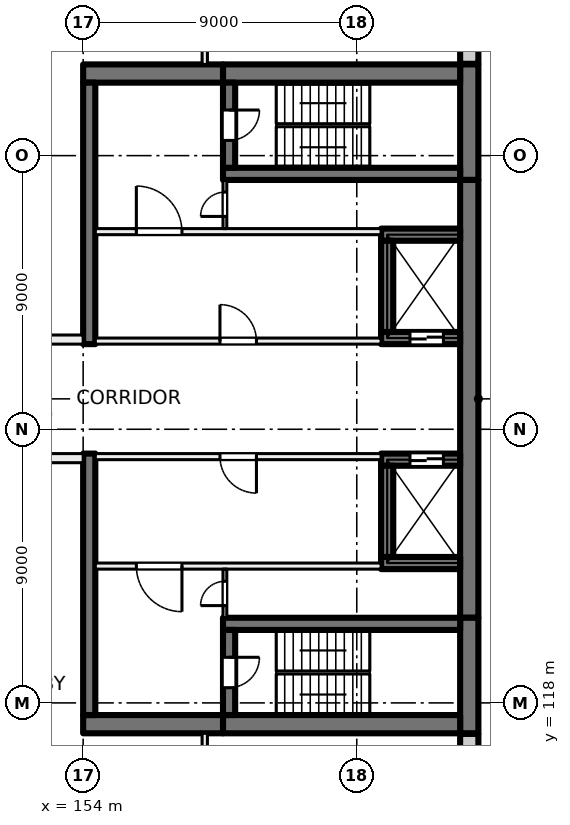
"""IFC4 building model, lengths in metres.
Left out: names, types, materials, properties, quantities, classifications, styles, units other than length and angle.
Written with IfcOpenShell. Run it as: python <this file> out.ifc"""

import sys

from ifc_helpers import new_model, si_unit, direction, frame, frame_2d, origin, place, context, subcontext, project, spatial, rectangle, extrude, element, fill, save


model = new_model("IFC4")
c1 = context("Model", 3, precision=1e-05, world=origin(), true_north=direction((0.0, 1.0)))
c2 = subcontext(c1, "Body", "Model", "MODEL_VIEW")
j1 = project(units=[si_unit("LENGTHUNIT", "METRE"), si_unit("PLANEANGLEUNIT", "RADIAN")], contexts=[c1])
p1 = place(None, origin())
s1 = spatial("IfcSite", under=j1, at=p1, CompositionType="ELEMENT")
p2 = place(p1, origin())
s2 = spatial("IfcBuilding", under=s1, at=p2, CompositionType="ELEMENT")
p3 = place(p2, frame((0.0, 0.0, 51.5)))
s3 = spatial("IfcBuildingStorey", under=s2, at=p3, CompositionType="ELEMENT", Elevation=51.5)
p4 = place(p3, frame((166.7, 139.0, 0.0), z_axis=(0.0, 0.0, 1.0), x_axis=(0.0, -1.0, 0.0)))
e1 = element("IfcWall", 1, at=p4, inside=s3, PredefinedType="SHEAR", context=c2, shape_type="SweptSolid", body=[
    extrude(rectangle(XDim=3.8, YDim=0.6, at=frame_2d((1.9, 0.0))), origin(), (0.0, 0.0, 1.0), 4.0),
])
p5 = place(p3, frame((166.7, 135.2, 0.0), z_axis=(0.0, 0.0, 1.0), x_axis=(0.0, -1.0, 0.0)))
e2 = element("IfcWall", 2, at=p5, inside=s3, PredefinedType="SHEAR", context=c2, shape_type="SweptSolid", body=[
    extrude(rectangle(XDim=14.4, YDim=0.6, at=frame_2d((7.2, 0.0))), origin(), (0.0, 0.0, 1.0), 4.0),
])
p6 = place(p3, frame((166.7, 120.8, 0.0), z_axis=(0.0, 0.0, 1.0), x_axis=(0.0, -1.0, 0.0)))
e3 = element("IfcWall", 3, at=p6, inside=s3, PredefinedType="SHEAR", context=c2, shape_type="SweptSolid", body=[
    extrude(rectangle(XDim=3.8, YDim=0.6, at=frame_2d((1.9, 0.0))), origin(), (0.0, 0.0, 1.0), 4.0),
])
for number, where, z_axis, x_axis in (
    (4, (166.4, 138.7, 0.0), (0.0, 0.0, 1.0), (-1.0, 0.0, 0.0)),
    (5, (166.4, 117.3, 0.0), (0.0, 0.0, 1.0), (-1.0, 0.0, 0.0)),
):
    element("IfcWall", number, at=place(p3, frame(where, z_axis=z_axis, x_axis=x_axis)), inside=s3, PredefinedType="SHEAR", context=c2, shape_type="SweptSolid", body=[
        extrude(rectangle(XDim=7.8, YDim=0.6, at=frame_2d((3.9, 0.0))), origin(), (0.0, 0.0, 1.0), 4.0),
    ])
for number, where, z_axis, x_axis in (
    (6, (158.6, 138.7, 0.0), (0.0, 0.0, 1.0), (-1.0, 0.0, 0.0)),
    (7, (158.6, 117.3, 0.0), (0.0, 0.0, 1.0), (-1.0, 0.0, 0.0)),
):
    element("IfcWall", number, at=place(p3, frame(where, z_axis=z_axis, x_axis=x_axis)), inside=s3, PredefinedType="SHEAR", context=c2, shape_type="SweptSolid", body=[
        extrude(rectangle(XDim=4.6, YDim=0.6, at=frame_2d((2.3, 0.0))), origin(), (0.0, 0.0, 1.0), 4.0),
    ])
p7 = place(p3, frame((166.4, 135.4, 0.0), z_axis=(0.0, 0.0, 1.0), x_axis=(-1.0, 0.0, 0.0)))
e8 = element("IfcWall", 8, at=p7, inside=s3, PredefinedType="SHEAR", context=c2, shape_type="SweptSolid", body=[
    extrude(rectangle(XDim=7.8, YDim=0.4, at=frame_2d((3.9, 0.0))), origin(), (0.0, 0.0, 1.0), 4.0),
])
p8 = place(p3, frame((158.8, 138.4, 0.0), z_axis=(0.0, 0.0, 1.0), x_axis=(0.0, -1.0, 0.0)))
e9 = element("IfcWall", 9, at=p8, inside=s3, PredefinedType="SHEAR", context=c2, shape_type="SweptSolid", body=[
    extrude(rectangle(XDim=2.8, YDim=0.4, at=frame_2d((1.4, 0.0))), origin(), (0.0, 0.0, 1.0), 4.0),
])
p9 = place(p8, frame((0.9, 0.0, 0.0)))
e10 = element("IfcOpeningElement", 10, at=p9, cuts=e9, PredefinedType="OPENING", context=c2, shape_type="SweptSolid", body=[
    extrude(rectangle(XDim=1.0, YDim=2.1, at=frame_2d((0.5, 1.05))), frame((0.0, 0.21, 0.0), z_axis=(0.0, -1.0, 0.0), x_axis=(1.0, 0.0, 0.0)), (0.0, 0.0, 1.0), 0.42),
])
p10 = place(p3, frame((166.4, 120.6, 0.0), z_axis=(0.0, 0.0, 1.0), x_axis=(-1.0, 0.0, 0.0)))
e11 = element("IfcWall", 11, at=p10, inside=s3, PredefinedType="SHEAR", context=c2, shape_type="SweptSolid", body=[
    extrude(rectangle(XDim=7.8, YDim=0.4, at=frame_2d((3.9, 0.0))), origin(), (0.0, 0.0, 1.0), 4.0),
])
p11 = place(p3, frame((158.8, 120.4, 0.0), z_axis=(0.0, 0.0, 1.0), x_axis=(0.0, -1.0, 0.0)))
e12 = element("IfcWall", 12, at=p11, inside=s3, PredefinedType="SHEAR", context=c2, shape_type="SweptSolid", body=[
    extrude(rectangle(XDim=2.8, YDim=0.4, at=frame_2d((1.4, 0.0))), origin(), (0.0, 0.0, 1.0), 4.0),
])
p12 = place(p11, frame((0.9, 0.0, 0.0)))
e13 = element("IfcOpeningElement", 13, at=p12, cuts=e12, PredefinedType="OPENING", context=c2, shape_type="SweptSolid", body=[
    extrude(rectangle(XDim=1.0, YDim=2.1, at=frame_2d((0.5, 1.05))), frame((0.0, 0.21, 0.0), z_axis=(0.0, -1.0, 0.0), x_axis=(1.0, 0.0, 0.0)), (0.0, 0.0, 1.0), 0.42),
])
p13 = place(p3, frame((166.4, 130.0, 0.0), z_axis=(0.0, 0.0, 1.0), x_axis=(-1.0, 0.0, 0.0)))
e14 = element("IfcWall", 14, at=p13, inside=s3, PredefinedType="SHEAR", context=c2, shape_type="SweptSolid", body=[
    extrude(rectangle(XDim=2.6, YDim=0.4, at=frame_2d((1.3, 0.0))), origin(), (0.0, 0.0, 1.0), 4.0),
])
p14 = place(p13, frame((0.55, 0.0, 0.0)))
e15 = element("IfcOpeningElement", 15, at=p14, cuts=e14, PredefinedType="OPENING", context=c2, shape_type="SweptSolid", body=[
    extrude(rectangle(XDim=1.1, YDim=2.1, at=frame_2d((0.55, 1.05))), frame((0.0, 0.21, 0.0), z_axis=(0.0, -1.0, 0.0), x_axis=(1.0, 0.0, 0.0)), (0.0, 0.0, 1.0), 0.42),
])
p15 = place(p3, frame((166.4, 133.4, 0.0), z_axis=(0.0, 0.0, 1.0), x_axis=(-1.0, 0.0, 0.0)))
e16 = element("IfcWall", 16, at=p15, inside=s3, PredefinedType="SHEAR", context=c2, shape_type="SweptSolid", body=[
    extrude(rectangle(XDim=2.6, YDim=0.4, at=frame_2d((1.3, 0.0))), origin(), (0.0, 0.0, 1.0), 4.0),
])
p16 = place(p3, frame((164.0, 133.2, 0.0), z_axis=(0.0, 0.0, 1.0), x_axis=(0.0, -1.0, 0.0)))
e17 = element("IfcWall", 17, at=p16, inside=s3, PredefinedType="SHEAR", context=c2, shape_type="SweptSolid", body=[
    extrude(rectangle(XDim=3.0, YDim=0.4, at=frame_2d((1.5, 0.0))), origin(), (0.0, 0.0, 1.0), 4.0),
])
p17 = place(p3, frame((166.4, 126.0, 0.0), z_axis=(0.0, 0.0, 1.0), x_axis=(-1.0, 0.0, 0.0)))
e18 = element("IfcWall", 18, at=p17, inside=s3, PredefinedType="SHEAR", context=c2, shape_type="SweptSolid", body=[
    extrude(rectangle(XDim=2.6, YDim=0.4, at=frame_2d((1.3, 0.0))), origin(), (0.0, 0.0, 1.0), 4.0),
])
p18 = place(p17, frame((0.55, 0.0, 0.0)))
e19 = element("IfcOpeningElement", 19, at=p18, cuts=e18, PredefinedType="OPENING", context=c2, shape_type="SweptSolid", body=[
    extrude(rectangle(XDim=1.1, YDim=2.1, at=frame_2d((0.55, 1.05))), frame((0.0, 0.21, 0.0), z_axis=(0.0, -1.0, 0.0), x_axis=(1.0, 0.0, 0.0)), (0.0, 0.0, 1.0), 0.42),
])
p19 = place(p3, frame((166.4, 122.6, 0.0), z_axis=(0.0, 0.0, 1.0), x_axis=(-1.0, 0.0, 0.0)))
e20 = element("IfcWall", 20, at=p19, inside=s3, PredefinedType="SHEAR", context=c2, shape_type="SweptSolid", body=[
    extrude(rectangle(XDim=2.6, YDim=0.4, at=frame_2d((1.3, 0.0))), origin(), (0.0, 0.0, 1.0), 4.0),
])
p20 = place(p3, frame((164.0, 125.8, 0.0), z_axis=(0.0, 0.0, 1.0), x_axis=(0.0, -1.0, 0.0)))
e21 = element("IfcWall", 21, at=p20, inside=s3, PredefinedType="SHEAR", context=c2, shape_type="SweptSolid", body=[
    extrude(rectangle(XDim=3.0, YDim=0.4, at=frame_2d((1.5, 0.0))), origin(), (0.0, 0.0, 1.0), 4.0),
])
for number, where, z_axis, x_axis in (
    (22, (154.2, 138.4, 0.0), (0.0, 0.0, 1.0), (0.0, -1.0, 0.0)),
    (23, (154.2, 126.2, 0.0), (0.0, 0.0, 1.0), (0.0, -1.0, 0.0)),
):
    element("IfcWall", number, at=place(p3, frame(where, z_axis=z_axis, x_axis=x_axis)), inside=s3, PredefinedType="SHEAR", context=c2, shape_type="SweptSolid", body=[
        extrude(rectangle(XDim=8.6, YDim=0.4, at=frame_2d((4.3, 0.0))), origin(), (0.0, 0.0, 1.0), 4.0),
    ])
p21 = place(p3, frame((166.7, 116.98, 0.0), z_axis=(0.0, 0.0, 1.0), x_axis=(0.0, -1.0, 0.0)))
e24 = element("IfcWall", 24, at=p21, inside=s3, PredefinedType="SOLIDWALL", context=c2, shape_type="SweptSolid", body=[
    extrude(rectangle(XDim=2.98, YDim=0.6, at=frame_2d((1.49, 0.0))), origin(), (0.0, 0.0, 1.0), 3.625),
])
p22 = place(p3, frame((166.7, 141.93, 0.0), z_axis=(0.0, 0.0, 1.0), x_axis=(0.0, -1.0, 0.0)))
e25 = element("IfcWall", 25, at=p22, inside=s3, PredefinedType="SOLIDWALL", context=c2, shape_type="SweptSolid", body=[
    extrude(rectangle(XDim=2.91, YDim=0.6, at=frame_2d((1.455, 0.0))), origin(), (0.0, 0.0, 1.0), 3.625),
])
p23 = place(p3, frame((163.8, 126.1, 0.0), z_axis=(0.0, 0.0, 1.0), x_axis=(-1.0, 0.0, 0.0)))
e26 = element("IfcWall", 26, at=p23, inside=s3, PredefinedType="PARTITIONING", context=c2, shape_type="SweptSolid", body=[
    extrude(rectangle(XDim=9.4, YDim=0.2, at=frame_2d((4.7, 0.0))), origin(), (0.0, 0.0, 1.0), 3.625),
])
p24 = place(p23, frame((4.1, 0.0, 0.0)))
e27 = element("IfcOpeningElement", 27, at=p24, cuts=e26, PredefinedType="OPENING", context=c2, shape_type="SweptSolid", body=[
    extrude(rectangle(XDim=1.2, YDim=2.1, at=frame_2d((0.6, 1.05))), frame((0.0, 0.11, 0.0), z_axis=(0.0, -1.0, 0.0), x_axis=(1.0, 0.0, 0.0)), (0.0, 0.0, 1.0), 0.22),
])
p25 = place(p3, frame((163.8, 122.5, 0.0), z_axis=(0.0, 0.0, 1.0), x_axis=(-1.0, 0.0, 0.0)))
e28 = element("IfcWall", 28, at=p25, inside=s3, PredefinedType="PARTITIONING", context=c2, shape_type="SweptSolid", body=[
    extrude(rectangle(XDim=9.4, YDim=0.2, at=frame_2d((4.7, 0.0))), origin(), (0.0, 0.0, 1.0), 3.625),
])
p26 = place(p25, frame((6.55, 0.0, 0.0)))
e29 = element("IfcOpeningElement", 29, at=p26, cuts=e28, PredefinedType="OPENING", context=c2, shape_type="SweptSolid", body=[
    extrude(rectangle(XDim=1.5, YDim=2.1, at=frame_2d((0.75, 1.05))), frame((0.0, 0.11, 0.0), z_axis=(0.0, -1.0, 0.0), x_axis=(1.0, 0.0, 0.0)), (0.0, 0.0, 1.0), 0.22),
])
p27 = place(p3, frame((158.663, 120.8, 0.0), z_axis=(0.0, 0.0, 1.0), x_axis=(0.0, 1.0, 0.0)))
e30 = element("IfcWall", 30, at=p27, inside=s3, PredefinedType="PARTITIONING", context=c2, shape_type="SweptSolid", body=[
    extrude(rectangle(XDim=1.6, YDim=0.125, at=frame_2d((0.8, 0.0))), origin(), (0.0, 0.0, 1.0), 3.625),
])
p28 = place(p27, frame((0.4, 0.0, 0.0)))
e31 = element("IfcOpeningElement", 31, at=p28, cuts=e30, PredefinedType="OPENING", context=c2, shape_type="SweptSolid", body=[
    extrude(rectangle(XDim=0.8, YDim=2.1, at=frame_2d((0.4, 1.05))), frame((0.0, 0.073, 0.0), z_axis=(0.0, -1.0, 0.0), x_axis=(1.0, 0.0, 0.0)), (0.0, 0.0, 1.0), 0.145),
])
p29 = place(p3, frame((154.4, 129.9, 0.0), z_axis=(0.0, 0.0, 1.0), x_axis=(1.0, 0.0, 0.0)))
e32 = element("IfcWall", 32, at=p29, inside=s3, PredefinedType="PARTITIONING", context=c2, shape_type="SweptSolid", body=[
    extrude(rectangle(XDim=9.4, YDim=0.2, at=frame_2d((4.7, 0.0))), origin(), (0.0, 0.0, 1.0), 3.625),
])
p30 = place(p29, frame((4.1, 0.0, 0.0)))
e33 = element("IfcOpeningElement", 33, at=p30, cuts=e32, PredefinedType="OPENING", context=c2, shape_type="SweptSolid", body=[
    extrude(rectangle(XDim=1.2, YDim=2.1, at=frame_2d((0.6, 1.05))), frame((0.0, 0.11, 0.0), z_axis=(0.0, -1.0, 0.0), x_axis=(1.0, 0.0, 0.0)), (0.0, 0.0, 1.0), 0.22),
])
p31 = place(p3, frame((154.4, 133.5, 0.0), z_axis=(0.0, 0.0, 1.0), x_axis=(1.0, 0.0, 0.0)))
e34 = element("IfcWall", 34, at=p31, inside=s3, PredefinedType="PARTITIONING", context=c2, shape_type="SweptSolid", body=[
    extrude(rectangle(XDim=9.4, YDim=0.2, at=frame_2d((4.7, 0.0))), origin(), (0.0, 0.0, 1.0), 3.625),
])
p32 = place(p31, frame((1.35, 0.0, 0.0)))
e35 = element("IfcOpeningElement", 35, at=p32, cuts=e34, PredefinedType="OPENING", context=c2, shape_type="SweptSolid", body=[
    extrude(rectangle(XDim=1.5, YDim=2.1, at=frame_2d((0.75, 1.05))), frame((0.0, 0.11, 0.0), z_axis=(0.0, -1.0, 0.0), x_axis=(1.0, 0.0, 0.0)), (0.0, 0.0, 1.0), 0.22),
])
p33 = place(p3, frame((158.663, 133.6, 0.0), z_axis=(0.0, 0.0, 1.0), x_axis=(0.0, 1.0, 0.0)))
e36 = element("IfcWall", 36, at=p33, inside=s3, PredefinedType="PARTITIONING", context=c2, shape_type="SweptSolid", body=[
    extrude(rectangle(XDim=1.6, YDim=0.125, at=frame_2d((0.8, 0.0))), origin(), (0.0, 0.0, 1.0), 3.625),
])
p34 = place(p33, frame((0.4, 0.0, 0.0)))
e37 = element("IfcOpeningElement", 37, at=p34, cuts=e36, PredefinedType="OPENING", context=c2, shape_type="SweptSolid", body=[
    extrude(rectangle(XDim=0.8, YDim=2.1, at=frame_2d((0.4, 1.05))), frame((0.0, 0.073, 0.0), z_axis=(0.0, -1.0, 0.0), x_axis=(1.0, 0.0, 0.0)), (0.0, 0.0, 1.0), 0.145),
])
p35 = place(p3, frame((140.0, 129.95, 0.0), z_axis=(0.0, 0.0, 1.0), x_axis=(1.0, 0.0, 0.0)))
e38 = element("IfcWall", 38, at=p35, inside=s3, PredefinedType="PARTITIONING", context=c2, shape_type="SweptSolid", body=[
    extrude(rectangle(XDim=14.0, YDim=0.3, at=frame_2d((7.0, 0.0))), origin(), (0.0, 0.0, 1.0), 3.625),
])
p36 = place(p35, frame((6.1, 0.0, 0.0)))
e39 = element("IfcOpeningElement", 39, at=p36, cuts=e38, PredefinedType="OPENING", context=c2, shape_type="SweptSolid", body=[
    extrude(rectangle(XDim=1.8, YDim=2.1, at=frame_2d((0.9, 1.05))), frame((0.0, 0.16, 0.0), z_axis=(0.0, -1.0, 0.0), x_axis=(1.0, 0.0, 0.0)), (0.0, 0.0, 1.0), 0.32),
])
p37 = place(p3, frame((154.0, 126.05, 0.0), z_axis=(0.0, 0.0, 1.0), x_axis=(-1.0, 0.0, 0.0)))
e40 = element("IfcWall", 40, at=p37, inside=s3, PredefinedType="PARTITIONING", context=c2, shape_type="SweptSolid", body=[
    extrude(rectangle(XDim=14.0, YDim=0.3, at=frame_2d((7.0, 0.0))), origin(), (0.0, 0.0, 1.0), 3.625),
])
p38 = place(p37, frame((7.75, 0.0, 0.0)))
e41 = element("IfcOpeningElement", 41, at=p38, cuts=e40, PredefinedType="OPENING", context=c2, shape_type="SweptSolid", body=[
    extrude(rectangle(XDim=1.0, YDim=2.1, at=frame_2d((0.5, 1.05))), frame((0.0, 0.16, 0.0), z_axis=(0.0, -1.0, 0.0), x_axis=(1.0, 0.0, 0.0)), (0.0, 0.0, 1.0), 0.32),
])
p39 = place(p37, frame((1.6, 0.0, 0.0)))
e42 = element("IfcOpeningElement", 42, at=p39, cuts=e40, PredefinedType="OPENING", context=c2, shape_type="SweptSolid", body=[
    extrude(rectangle(XDim=1.8, YDim=2.1, at=frame_2d((0.9, 1.05))), frame((0.0, 0.16, 0.0), z_axis=(0.0, -1.0, 0.0), x_axis=(1.0, 0.0, 0.0)), (0.0, 0.0, 1.0), 0.32),
])
p40 = place(p3, frame((158.0, 110.6, 0.0), z_axis=(0.0, 0.0, 1.0), x_axis=(0.0, 1.0, 0.0)))
e43 = element("IfcWall", 43, at=p40, inside=s3, PredefinedType="PARTITIONING", context=c2, shape_type="SweptSolid", body=[
    extrude(rectangle(XDim=6.4, YDim=0.175, at=frame_2d((3.2, 0.0))), origin(), (0.0, 0.0, 1.0), 3.625),
])
p41 = place(p40, frame((2.6, 0.0, 0.0)))
e44 = element("IfcOpeningElement", 44, at=p41, cuts=e43, PredefinedType="OPENING", context=c2, shape_type="SweptSolid", body=[
    extrude(rectangle(XDim=1.2, YDim=2.1, at=frame_2d((0.6, 1.05))), frame((0.0, 0.097, 0.0), z_axis=(0.0, -1.0, 0.0), x_axis=(1.0, 0.0, 0.0)), (0.0, 0.0, 1.0), 0.195),
])
p42 = place(p3, frame((158.0, 139.0, 0.0), z_axis=(0.0, 0.0, 1.0), x_axis=(0.0, 1.0, 0.0)))
e45 = element("IfcWall", 45, at=p42, inside=s3, PredefinedType="PARTITIONING", context=c2, shape_type="SweptSolid", body=[
    extrude(rectangle(XDim=6.4, YDim=0.175, at=frame_2d((3.2, 0.0))), origin(), (0.0, 0.0, 1.0), 3.625),
])
p43 = place(p42, frame((2.6, 0.0, 0.0)))
e46 = element("IfcOpeningElement", 46, at=p43, cuts=e45, PredefinedType="OPENING", context=c2, shape_type="SweptSolid", body=[
    extrude(rectangle(XDim=1.2, YDim=2.1, at=frame_2d((0.6, 1.05))), frame((0.0, 0.097, 0.0), z_axis=(0.0, -1.0, 0.0), x_axis=(1.0, 0.0, 0.0)), (0.0, 0.0, 1.0), 0.195),
])
p44 = place(p18, origin())
e47 = element("IfcDoor", 47, at=p44, inside=s3, OperationType="DOUBLE_DOOR_SLIDING", PredefinedType="DOOR", context=c2, shape_type="SweptSolid", body=[
    extrude(rectangle(XDim=1.1, YDim=2.1, at=frame_2d((0.55, 1.05))), frame((0.0, 0.025, 0.0), z_axis=(0.0, -1.0, 0.0), x_axis=(1.0, 0.0, 0.0)), (0.0, 0.0, 1.0), 0.05),
])
fill(e19, e47)
p45 = place(p14, origin())
e48 = element("IfcDoor", 48, at=p45, inside=s3, OperationType="DOUBLE_DOOR_SLIDING", PredefinedType="DOOR", context=c2, shape_type="SweptSolid", body=[
    extrude(rectangle(XDim=1.1, YDim=2.1, at=frame_2d((0.55, 1.05))), frame((0.0, 0.025, 0.0), z_axis=(0.0, -1.0, 0.0), x_axis=(1.0, 0.0, 0.0)), (0.0, 0.0, 1.0), 0.05),
])
fill(e15, e48)
p46 = place(p24, origin())
e49 = element("IfcDoor", 49, at=p46, inside=s3, OperationType="DOUBLE_DOOR_SINGLE_SWING", PredefinedType="DOOR", context=c2, shape_type="SweptSolid", body=[
    extrude(rectangle(XDim=1.2, YDim=2.1, at=frame_2d((0.6, 1.05))), frame((0.0, 0.025, 0.0), z_axis=(0.0, -1.0, 0.0), x_axis=(1.0, 0.0, 0.0)), (0.0, 0.0, 1.0), 0.05),
])
fill(e27, e49)
p47 = place(p26, origin())
e50 = element("IfcDoor", 50, at=p47, inside=s3, OperationType="DOUBLE_DOOR_SINGLE_SWING", PredefinedType="DOOR", context=c2, shape_type="SweptSolid", body=[
    extrude(rectangle(XDim=1.5, YDim=2.1, at=frame_2d((0.75, 1.05))), frame((0.0, 0.025, 0.0), z_axis=(0.0, -1.0, 0.0), x_axis=(1.0, 0.0, 0.0)), (0.0, 0.0, 1.0), 0.05),
])
fill(e29, e50)
p48 = place(p12, origin())
e51 = element("IfcDoor", 51, at=p48, inside=s3, OperationType="SINGLE_SWING_LEFT", PredefinedType="DOOR", context=c2, shape_type="SweptSolid", body=[
    extrude(rectangle(XDim=1.0, YDim=2.1, at=frame_2d((0.5, 1.05))), frame((0.0, 0.025, 0.0), z_axis=(0.0, -1.0, 0.0), x_axis=(1.0, 0.0, 0.0)), (0.0, 0.0, 1.0), 0.05),
])
fill(e13, e51)
p49 = place(p28, origin())
e52 = element("IfcDoor", 52, at=p49, inside=s3, OperationType="SINGLE_SWING_RIGHT", PredefinedType="DOOR", context=c2, shape_type="SweptSolid", body=[
    extrude(rectangle(XDim=0.8, YDim=2.1, at=frame_2d((0.4, 1.05))), frame((0.0, 0.025, 0.0), z_axis=(0.0, -1.0, 0.0), x_axis=(1.0, 0.0, 0.0)), (0.0, 0.0, 1.0), 0.05),
])
fill(e31, e52)
p50 = place(p30, origin())
e53 = element("IfcDoor", 53, at=p50, inside=s3, OperationType="DOUBLE_DOOR_SINGLE_SWING", PredefinedType="DOOR", context=c2, shape_type="SweptSolid", body=[
    extrude(rectangle(XDim=1.2, YDim=2.1, at=frame_2d((0.6, 1.05))), frame((0.0, 0.025, 0.0), z_axis=(0.0, -1.0, 0.0), x_axis=(1.0, 0.0, 0.0)), (0.0, 0.0, 1.0), 0.05),
])
fill(e33, e53)
p51 = place(p32, origin())
e54 = element("IfcDoor", 54, at=p51, inside=s3, OperationType="DOUBLE_DOOR_SINGLE_SWING", PredefinedType="DOOR", context=c2, shape_type="SweptSolid", body=[
    extrude(rectangle(XDim=1.5, YDim=2.1, at=frame_2d((0.75, 1.05))), frame((0.0, 0.025, 0.0), z_axis=(0.0, -1.0, 0.0), x_axis=(1.0, 0.0, 0.0)), (0.0, 0.0, 1.0), 0.05),
])
fill(e35, e54)
p52 = place(p9, origin())
e55 = element("IfcDoor", 55, at=p52, inside=s3, OperationType="SINGLE_SWING_RIGHT", PredefinedType="DOOR", context=c2, shape_type="SweptSolid", body=[
    extrude(rectangle(XDim=1.0, YDim=2.1, at=frame_2d((0.5, 1.05))), frame((0.0, 0.025, 0.0), z_axis=(0.0, -1.0, 0.0), x_axis=(1.0, 0.0, 0.0)), (0.0, 0.0, 1.0), 0.05),
])
fill(e10, e55)
p53 = place(p34, origin())
e56 = element("IfcDoor", 56, at=p53, inside=s3, OperationType="SINGLE_SWING_LEFT", PredefinedType="DOOR", context=c2, shape_type="SweptSolid", body=[
    extrude(rectangle(XDim=0.8, YDim=2.1, at=frame_2d((0.4, 1.05))), frame((0.0, 0.025, 0.0), z_axis=(0.0, -1.0, 0.0), x_axis=(1.0, 0.0, 0.0)), (0.0, 0.0, 1.0), 0.05),
])
fill(e37, e56)
save(model, sys.argv[1])
